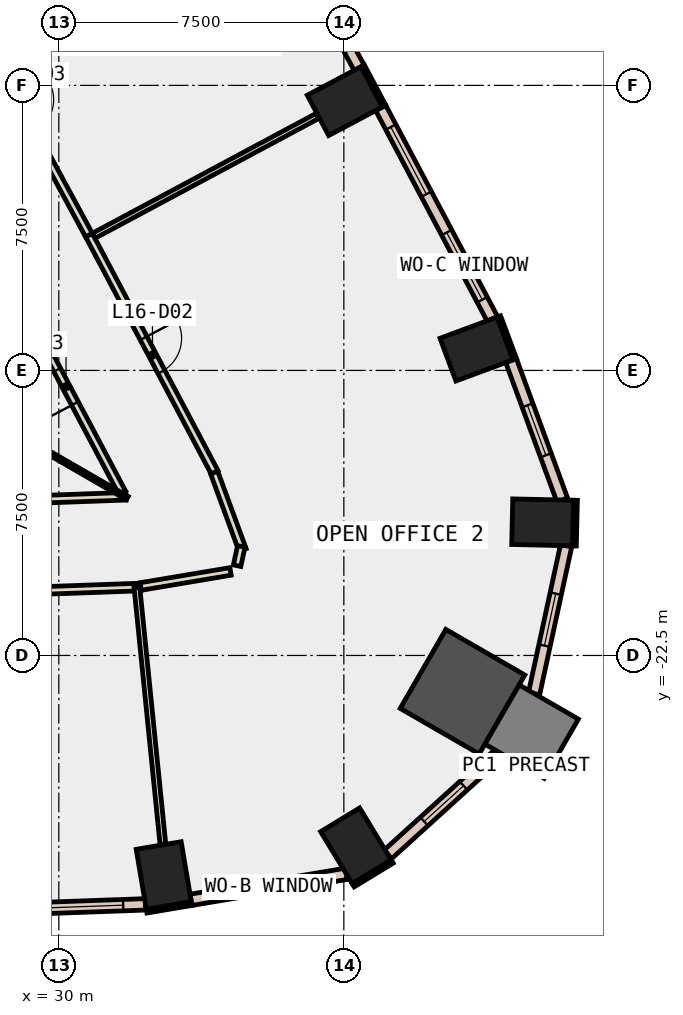
"""IFC4 building model, lengths in metres.
Left out: names, types, materials, properties, quantities, classifications, styles, units other than length and angle.
Written with IfcOpenShell. Run it as: python <this file> out.ifc"""

import sys

from ifc_helpers import new_model, si_unit, direction, frame, frame_2d, origin, origin_2d, place, context, subcontext, project, spatial, rectangle, extrude, element, fill, save


model = new_model("IFC4")
c1 = context("Model", 3, precision=1e-05, world=origin(), true_north=direction((0.0, 1.0)))
c2 = subcontext(c1, "Body", "Model", "MODEL_VIEW")
j1 = project(units=[si_unit("LENGTHUNIT", "METRE"), si_unit("PLANEANGLEUNIT", "RADIAN")], contexts=[c1])
p1 = place(None, origin())
s1 = spatial("IfcSite", under=j1, at=p1, CompositionType="ELEMENT")
p2 = place(p1, origin())
s2 = spatial("IfcBuilding", under=s1, at=p2, CompositionType="ELEMENT")
p3 = place(p2, frame((0.0, 0.0, 77.0)))
s3 = spatial("IfcBuildingStorey", under=s2, at=p3, CompositionType="ELEMENT", Elevation=77.0)
for number, where, z_axis, x_axis in (
    (1, (32.761, -28.29, -0.4), (0.0, 0.0, 1.0), (0.986, 0.167, 0.0)),
    (2, (37.818, -27.508, -0.4), (0.0, 0.0, 1.0), (0.855, 0.519, 0.0)),
):
    element("IfcColumn", number, at=place(p3, frame(where, z_axis=z_axis, x_axis=x_axis)), inside=s3, PredefinedType="COLUMN", context=c2, shape_type="SweptSolid", body=[
        extrude(rectangle(XDim=1.2, YDim=1.6, at=origin_2d()), origin(), (0.0, 0.0, 1.0), 4.0),
    ])
p4 = place(p3, frame((40.623, -23.454, -0.4), z_axis=(0.0, 0.0, 1.0), x_axis=(-0.866025403784, 0.5, 0.0)))
e3 = element("IfcColumn", 3, at=p4, inside=s3, PredefinedType="COLUMN", context=c2, shape_type="SweptSolid", body=[
    extrude(rectangle(XDim=2.4, YDim=2.4, at=origin_2d()), origin(), (0.0, 0.0, 1.0), 4.0),
])
for number, where, z_axis, x_axis in (
    (4, (42.731, -18.998, -0.4), (0.0, 0.0, 1.0), (0.023, 1.0, 0.0)),
    (5, (40.99, -14.438, -0.4), (0.0, 0.0, 1.0), (-0.348, 0.937, 0.0)),
    (6, (37.526, -7.914, -0.4), (0.0, 0.0, 1.0), (-0.469, 0.883, 0.0)),
):
    element("IfcColumn", number, at=place(p3, frame(where, z_axis=z_axis, x_axis=x_axis)), inside=s3, PredefinedType="COLUMN", context=c2, shape_type="SweptSolid", body=[
        extrude(rectangle(XDim=1.2, YDim=1.6, at=origin_2d()), origin(), (0.0, 0.0, 1.0), 4.0),
    ])
p5 = place(p3, frame((42.442, -24.504, -0.4), z_axis=(0.0, 0.0, 1.0), x_axis=(-0.866025403784, 0.5, 0.0)))
e7 = element("IfcColumn", 7, at=p5, inside=s3, PredefinedType="COLUMN", context=c2, shape_type="SweptSolid", body=[
    extrude(rectangle(XDim=1.8, YDim=1.8, at=origin_2d()), origin(), (0.0, 0.0, 1.0), 4.0),
])
p6 = place(p3, frame((41.996, -14.705, 0.0), z_axis=(0.0, 0.0, 1.0), x_axis=(-0.348446984414, 0.937328490473, 0.0)))
e8 = element("IfcWall", 8, at=p6, inside=s3, PredefinedType="STANDARD", context=c2, shape_type="SweptSolid", body=[
    extrude(rectangle(XDim=1.2, YDim=0.1, at=frame_2d((0.6, 0.0))), origin(), (0.0, 0.0, 1.0), 3.6),
])
p7 = place(p3, frame((38.558, -8.045, 0.0), z_axis=(0.0, 0.0, 1.0), x_axis=(-0.469467784567, 0.882949601763, 0.0)))
e9 = element("IfcWall", 9, at=p7, inside=s3, PredefinedType="STANDARD", context=c2, shape_type="SweptSolid", body=[
    extrude(rectangle(XDim=1.199, YDim=0.1, at=frame_2d((0.6, 0.0))), origin(), (0.0, 0.0, 1.0), 3.6),
])
p8 = place(p3, frame((32.311, -29.228, 0.0), z_axis=(0.0, 0.0, 1.0), x_axis=(0.986011774526, 0.166675674579, 0.0)))
e10 = element("IfcWall", 10, at=p8, inside=s3, PredefinedType="STANDARD", context=c2, shape_type="SweptSolid", body=[
    extrude(rectangle(XDim=1.2, YDim=0.1, at=frame_2d((0.6, 0.0))), origin(), (0.0, 0.0, 1.0), 3.6),
])
for number, where, z_axis, x_axis in (
    (11, (37.746, -28.546, 0.0), (0.0, 0.0, 1.0), (0.855, 0.519, 0.0)),
    (12, (43.567, -19.617, 0.0), (0.0, 0.0, 1.0), (0.023, 1.0, 0.0)),
):
    element("IfcWall", number, at=place(p3, frame(where, z_axis=z_axis, x_axis=x_axis)), inside=s3, PredefinedType="STANDARD", context=c2, shape_type="SweptSolid", body=[
        extrude(rectangle(XDim=1.2, YDim=0.1, at=frame_2d((0.6, 0.0))), origin(), (0.0, 0.0, 1.0), 3.6),
    ])
p9 = place(p3, frame((25.134, -29.305, 0.0), z_axis=(0.0, 0.0, 1.0), x_axis=(0.999359981296, 0.035771885388, 0.0)))
e13 = element("IfcWall", 13, at=p9, inside=s3, PredefinedType="STANDARD", context=c2, shape_type="SweptSolid", body=[
    extrude(rectangle(XDim=7.153, YDim=0.3, at=frame_2d((3.576, 0.0))), origin(), (0.0, 0.0, 1.0), 3.6),
])
p10 = place(p9, frame((0.588, 0.0, 0.9)))
e14 = element("IfcOpeningElement", 14, at=p10, cuts=e13, PredefinedType="OPENING", context=c2, shape_type="SweptSolid", body=[
    extrude(rectangle(XDim=2.4, YDim=2.6, at=frame_2d((1.2, 1.3))), frame((0.0, 0.16, 0.0), z_axis=(0.0, -1.0, 0.0), x_axis=(1.0, 0.0, 0.0)), (0.0, 0.0, 1.0), 0.32),
])
p11 = place(p9, frame((4.164, 0.0, 0.9)))
e15 = element("IfcOpeningElement", 15, at=p11, cuts=e13, PredefinedType="OPENING", context=c2, shape_type="SweptSolid", body=[
    extrude(rectangle(XDim=2.4, YDim=2.6, at=frame_2d((1.2, 1.3))), frame((0.0, 0.16, 0.0), z_axis=(0.0, -1.0, 0.0), x_axis=(1.0, 0.0, 0.0)), (0.0, 0.0, 1.0), 0.32),
])
p12 = place(p3, frame((33.477, -28.93, 0.0), z_axis=(0.0, 0.0, 1.0), x_axis=(0.986295041399, 0.164991185557, 0.0)))
e16 = element("IfcWall", 16, at=p12, inside=s3, PredefinedType="STANDARD", context=c2, shape_type="SweptSolid", body=[
    extrude(rectangle(XDim=4.145, YDim=0.3, at=frame_2d((2.072, 0.0))), origin(), (0.0, 0.0, 1.0), 3.6),
])
p13 = place(p12, frame((1.372, 0.0, 0.9)))
e17 = element("IfcOpeningElement", 17, at=p13, cuts=e16, PredefinedType="OPENING", context=c2, shape_type="SweptSolid", body=[
    extrude(rectangle(XDim=1.4, YDim=2.6, at=frame_2d((0.7, 1.3))), frame((0.0, 0.16, 0.0), z_axis=(0.0, -1.0, 0.0), x_axis=(1.0, 0.0, 0.0)), (0.0, 0.0, 1.0), 0.32),
])
p14 = place(p3, frame((38.657, -27.736, 0.0), z_axis=(0.0, 0.0, 1.0), x_axis=(0.740547309915, 0.6720042275, 0.0)))
e18 = element("IfcWall", 18, at=p14, inside=s3, PredefinedType="STANDARD", context=c2, shape_type="SweptSolid", body=[
    extrude(rectangle(XDim=3.982, YDim=0.3, at=frame_2d((1.991, 0.0))), origin(), (0.0, 0.0, 1.0), 3.6),
])
p15 = place(p14, frame((1.291, 0.0, 0.9)))
e19 = element("IfcOpeningElement", 19, at=p15, cuts=e18, PredefinedType="OPENING", context=c2, shape_type="SweptSolid", body=[
    extrude(rectangle(XDim=1.4, YDim=2.6, at=frame_2d((0.7, 1.3))), frame((0.0, 0.16, 0.0), z_axis=(0.0, -1.0, 0.0), x_axis=(1.0, 0.0, 0.0)), (0.0, 0.0, 1.0), 0.32),
])
p16 = place(p3, frame((42.506, -23.503, 0.0), z_axis=(0.0, 0.0, 1.0), x_axis=(0.211701618364, 0.977334346466, 0.0)))
e20 = element("IfcWall", 20, at=p16, inside=s3, PredefinedType="STANDARD", context=c2, shape_type="SweptSolid", body=[
    extrude(rectangle(XDim=3.982, YDim=0.3, at=frame_2d((1.991, 0.0))), origin(), (0.0, 0.0, 1.0), 3.6),
])
p17 = place(p16, frame((1.291, 0.0, 0.9)))
e21 = element("IfcOpeningElement", 21, at=p17, cuts=e20, PredefinedType="OPENING", context=c2, shape_type="SweptSolid", body=[
    extrude(rectangle(XDim=1.4, YDim=2.6, at=frame_2d((0.7, 1.3))), frame((0.0, 0.16, 0.0), z_axis=(0.0, -1.0, 0.0), x_axis=(1.0, 0.0, 0.0)), (0.0, 0.0, 1.0), 0.32),
])
p18 = place(p3, frame((43.248, -18.41, 0.0), z_axis=(0.0, 0.0, 1.0), x_axis=(-0.344819708397, 0.938668934556, 0.0)))
e22 = element("IfcWall", 22, at=p18, inside=s3, PredefinedType="STANDARD", context=c2, shape_type="SweptSolid", body=[
    extrude(rectangle(XDim=3.91, YDim=0.3, at=frame_2d((1.955, 0.0))), origin(), (0.0, 0.0, 1.0), 3.6),
])
p19 = place(p18, frame((1.255, 0.0, 0.9)))
e23 = element("IfcOpeningElement", 23, at=p19, cuts=e22, PredefinedType="OPENING", context=c2, shape_type="SweptSolid", body=[
    extrude(rectangle(XDim=1.4, YDim=2.6, at=frame_2d((0.7, 1.3))), frame((0.0, 0.16, 0.0), z_axis=(0.0, -1.0, 0.0), x_axis=(1.0, 0.0, 0.0)), (0.0, 0.0, 1.0), 0.32),
])
p20 = place(p3, frame((41.409, -13.644, 0.0), z_axis=(0.0, 0.0, 1.0), x_axis=(-0.467968066899, 0.883745375299, 0.0)))
e24 = element("IfcWall", 24, at=p20, inside=s3, PredefinedType="STANDARD", context=c2, shape_type="SweptSolid", body=[
    extrude(rectangle(XDim=6.282, YDim=0.3, at=frame_2d((3.141, 0.0))), origin(), (0.0, 0.0, 1.0), 3.6),
])
p21 = place(p20, frame((0.571, 0.0, 0.9)))
e25 = element("IfcOpeningElement", 25, at=p21, cuts=e24, PredefinedType="OPENING", context=c2, shape_type="SweptSolid", body=[
    extrude(rectangle(XDim=2.0, YDim=2.6, at=frame_2d((1.0, 1.3))), frame((0.0, 0.16, 0.0), z_axis=(0.0, -1.0, 0.0), x_axis=(1.0, 0.0, 0.0)), (0.0, 0.0, 1.0), 0.32),
])
p22 = place(p20, frame((3.712, 0.0, 0.9)))
e26 = element("IfcOpeningElement", 26, at=p22, cuts=e24, PredefinedType="OPENING", context=c2, shape_type="SweptSolid", body=[
    extrude(rectangle(XDim=2.0, YDim=2.6, at=frame_2d((1.0, 1.3))), frame((0.0, 0.16, 0.0), z_axis=(0.0, -1.0, 0.0), x_axis=(1.0, 0.0, 0.0)), (0.0, 0.0, 1.0), 0.32),
])
p23 = place(p3, frame((37.903, -7.036, 0.0), z_axis=(0.0, 0.0, 1.0), x_axis=(-0.476174096946, 0.879351027404, 0.0)))
e27 = element("IfcWall", 27, at=p23, inside=s3, PredefinedType="STANDARD", context=c2, shape_type="SweptSolid", body=[
    extrude(rectangle(XDim=6.131, YDim=0.3, at=frame_2d((3.065, 0.0))), origin(), (0.0, 0.0, 1.0), 3.6),
])
p24 = place(p23, frame((0.533, 0.0, 0.9)))
e28 = element("IfcOpeningElement", 28, at=p24, cuts=e27, PredefinedType="OPENING", context=c2, shape_type="SweptSolid", body=[
    extrude(rectangle(XDim=2.0, YDim=2.6, at=frame_2d((1.0, 1.3))), frame((0.0, 0.16, 0.0), z_axis=(0.0, -1.0, 0.0), x_axis=(1.0, 0.0, 0.0)), (0.0, 0.0, 1.0), 0.32),
])
p25 = place(p23, frame((3.598, 0.0, 0.9)))
e29 = element("IfcOpeningElement", 29, at=p25, cuts=e27, PredefinedType="OPENING", context=c2, shape_type="SweptSolid", body=[
    extrude(rectangle(XDim=2.0, YDim=2.6, at=frame_2d((1.0, 1.3))), frame((0.0, 0.16, 0.0), z_axis=(0.0, -1.0, 0.0), x_axis=(1.0, 0.0, 0.0)), (0.0, 0.0, 1.0), 0.32),
])
p26 = place(p3, frame((24.208, -18.581, 0.0), z_axis=(0.0, 0.0, 1.0), x_axis=(0.99936260762, 0.035698438215, 0.0)))
e30 = element("IfcWall", 30, at=p26, inside=s3, PredefinedType="PARTITIONING", context=c2, shape_type="SweptSolid", body=[
    extrude(rectangle(XDim=7.564, YDim=0.2, at=frame_2d((3.782, 0.0))), origin(), (0.0, 0.0, 1.0), 3.6),
])
p27 = place(p26, frame((3.282, 0.0, 0.0)))
e31 = element("IfcOpeningElement", 31, at=p27, cuts=e30, PredefinedType="OPENING", context=c2, shape_type="SweptSolid", body=[
    extrude(rectangle(XDim=1.0, YDim=2.1, at=frame_2d((0.5, 1.05))), frame((0.0, 0.11, 0.0), z_axis=(0.0, -1.0, 0.0), x_axis=(1.0, 0.0, 0.0)), (0.0, 0.0, 1.0), 0.22),
])
p28 = place(p3, frame((31.668, -18.219, 0.0), z_axis=(0.0, 0.0, 1.0), x_axis=(-0.468058220157, 0.883697630722, 0.0)))
e32 = element("IfcWall", 32, at=p28, inside=s3, PredefinedType="PARTITIONING", context=c2, shape_type="SweptSolid", body=[
    extrude(rectangle(XDim=6.316, YDim=0.2, at=frame_2d((3.158, 0.0))), origin(), (0.0, 0.0, 1.0), 3.6),
])
p29 = place(p28, frame((2.658, 0.0, 0.0)))
e33 = element("IfcOpeningElement", 33, at=p29, cuts=e32, PredefinedType="OPENING", context=c2, shape_type="SweptSolid", body=[
    extrude(rectangle(XDim=1.0, YDim=2.1, at=frame_2d((0.5, 1.05))), frame((0.0, 0.11, 0.0), z_axis=(0.0, -1.0, 0.0), x_axis=(1.0, 0.0, 0.0)), (0.0, 0.0, 1.0), 0.22),
])
p30 = place(p3, frame((32.154, -20.699, 0.0), z_axis=(0.0, 0.0, 1.0), x_axis=(-0.999363643656, -0.035669423029, 0.0)))
e34 = element("IfcWall", 34, at=p30, inside=s3, PredefinedType="PARTITIONING", context=c2, shape_type="SweptSolid", body=[
    extrude(rectangle(XDim=7.878, YDim=0.2, at=frame_2d((3.939, 0.0))), origin(), (0.0, 0.0, 1.0), 3.6),
])
p31 = place(p3, frame((30.793, -11.439, 0.0), z_axis=(0.0, 0.0, 1.0), x_axis=(0.468043291185, -0.883705537822, 0.0)))
e35 = element("IfcWall", 35, at=p31, inside=s3, PredefinedType="PARTITIONING", context=c2, shape_type="SweptSolid", body=[
    extrude(rectangle(XDim=7.066, YDim=0.2, at=frame_2d((3.533, 0.0))), origin(), (0.0, 0.0, 1.0), 3.6),
])
p32 = place(p31, frame((3.071, 0.0, 0.0)))
e36 = element("IfcOpeningElement", 36, at=p32, cuts=e35, PredefinedType="OPENING", context=c2, shape_type="SweptSolid", body=[
    extrude(rectangle(XDim=1.0, YDim=2.1, at=frame_2d((0.5, 1.05))), frame((0.0, 0.11, 0.0), z_axis=(0.0, -1.0, 0.0), x_axis=(1.0, 0.0, 0.0)), (0.0, 0.0, 1.0), 0.22),
])
p33 = place(p3, frame((34.088, -17.689, 0.0), z_axis=(0.0, 0.0, 1.0), x_axis=(0.34459875492, -0.938750072228, 0.0)))
e37 = element("IfcWall", 37, at=p33, inside=s3, PredefinedType="PARTITIONING", context=c2, shape_type="SweptSolid", body=[
    extrude(rectangle(XDim=2.168, YDim=0.2, at=frame_2d((1.084, 0.0))), origin(), (0.0, 0.0, 1.0), 3.6),
])
p34 = place(p3, frame((34.801, -19.631, 0.0), z_axis=(0.0, 0.0, 1.0), x_axis=(-0.212292845768, -0.977206092713, 0.0)))
e38 = element("IfcWall", 38, at=p34, inside=s3, PredefinedType="PARTITIONING", context=c2, shape_type="SweptSolid", body=[
    extrude(rectangle(XDim=0.519, YDim=0.2, at=frame_2d((0.259, 0.0))), origin(), (0.0, 0.0, 1.0), 3.6),
])
p35 = place(p3, frame((34.518, -20.289, 0.0), z_axis=(0.0, 0.0, 1.0), x_axis=(-0.986214562432, -0.165471559025, 0.0)))
e39 = element("IfcWall", 39, at=p35, inside=s3, PredefinedType="PARTITIONING", context=c2, shape_type="SweptSolid", body=[
    extrude(rectangle(XDim=2.399, YDim=0.2, at=frame_2d((1.199, 0.0))), origin(), (0.0, 0.0, 1.0), 3.6),
])
p36 = place(p3, frame((27.339, -5.062, 0.0), z_axis=(0.0, 0.0, 1.0), x_axis=(0.476248444599, -0.879310763619, 0.0)))
e40 = element("IfcWall", 40, at=p36, inside=s3, PredefinedType="PARTITIONING", context=c2, shape_type="SweptSolid", body=[
    extrude(rectangle(XDim=7.252, YDim=0.2, at=frame_2d((3.626, 0.0))), origin(), (0.0, 0.0, 1.0), 3.6),
])
p37 = place(p36, frame((3.201, 0.0, 0.0)))
e41 = element("IfcOpeningElement", 41, at=p37, cuts=e40, PredefinedType="OPENING", context=c2, shape_type="SweptSolid", body=[
    extrude(rectangle(XDim=1.0, YDim=2.1, at=frame_2d((0.5, 1.05))), frame((0.0, 0.11, 0.0), z_axis=(0.0, -1.0, 0.0), x_axis=(1.0, 0.0, 0.0)), (0.0, 0.0, 1.0), 0.22),
])
p38 = place(p3, frame((22.929, -13.235, 0.0), z_axis=(0.0, 0.0, 1.0), x_axis=(0.866003823807, -0.500037375755, 0.0)))
e42 = element("IfcWall", 42, at=p38, inside=s3, PredefinedType="PARTITIONING", context=c2, shape_type="SweptSolid", body=[
    extrude(rectangle(XDim=10.245, YDim=0.1, at=frame_2d((5.123, 0.0))), origin(), (0.0, 0.0, 1.0), 3.6),
])
p39 = place(p3, frame((32.054, -20.702, 0.0), z_axis=(0.0, 0.0, 1.0), x_axis=(0.100681219953, -0.994918736354, 0.0)))
e43 = element("IfcWall", 43, at=p39, inside=s3, PredefinedType="PARTITIONING", context=c2, shape_type="SweptSolid", body=[
    extrude(rectangle(XDim=6.794, YDim=0.15, at=frame_2d((3.397, 0.0))), origin(), (0.0, 0.0, 1.0), 3.6),
])
p40 = place(p3, frame((30.916, -11.458, 0.0), z_axis=(0.0, 0.0, 1.0), x_axis=(0.881525059883, 0.472137235132, 0.0)))
e44 = element("IfcWall", 44, at=p40, inside=s3, PredefinedType="PARTITIONING", context=c2, shape_type="SweptSolid", body=[
    extrude(rectangle(XDim=6.68, YDim=0.15, at=frame_2d((3.34, 0.0))), origin(), (0.0, 0.0, 1.0), 3.6),
])
p41 = place(p11, origin())
e45 = element("IfcWindow", 45, at=p41, inside=s3, PartitioningType="SINGLE_PANEL", PredefinedType="WINDOW", context=c2, shape_type="SweptSolid", body=[
    extrude(rectangle(XDim=2.4, YDim=2.6, at=frame_2d((1.2, 1.3))), frame((0.0, 0.03, 0.0), z_axis=(0.0, -1.0, 0.0), x_axis=(1.0, 0.0, 0.0)), (0.0, 0.0, 1.0), 0.06),
])
fill(e15, e45)
p42 = place(p13, origin())
e46 = element("IfcWindow", 46, at=p42, inside=s3, PartitioningType="SINGLE_PANEL", PredefinedType="WINDOW", context=c2, shape_type="SweptSolid", body=[
    extrude(rectangle(XDim=1.4, YDim=2.6, at=frame_2d((0.7, 1.3))), frame((0.0, 0.03, 0.0), z_axis=(0.0, -1.0, 0.0), x_axis=(1.0, 0.0, 0.0)), (0.0, 0.0, 1.0), 0.06),
])
fill(e17, e46)
p43 = place(p15, origin())
e47 = element("IfcWindow", 47, at=p43, inside=s3, PartitioningType="SINGLE_PANEL", PredefinedType="WINDOW", context=c2, shape_type="SweptSolid", body=[
    extrude(rectangle(XDim=1.4, YDim=2.6, at=frame_2d((0.7, 1.3))), frame((0.0, 0.03, 0.0), z_axis=(0.0, -1.0, 0.0), x_axis=(1.0, 0.0, 0.0)), (0.0, 0.0, 1.0), 0.06),
])
fill(e19, e47)
p44 = place(p17, origin())
e48 = element("IfcWindow", 48, at=p44, inside=s3, PartitioningType="SINGLE_PANEL", PredefinedType="WINDOW", context=c2, shape_type="SweptSolid", body=[
    extrude(rectangle(XDim=1.4, YDim=2.6, at=frame_2d((0.7, 1.3))), frame((0.0, 0.03, 0.0), z_axis=(0.0, -1.0, 0.0), x_axis=(1.0, 0.0, 0.0)), (0.0, 0.0, 1.0), 0.06),
])
fill(e21, e48)
p45 = place(p19, origin())
e49 = element("IfcWindow", 49, at=p45, inside=s3, PartitioningType="SINGLE_PANEL", PredefinedType="WINDOW", context=c2, shape_type="SweptSolid", body=[
    extrude(rectangle(XDim=1.4, YDim=2.6, at=frame_2d((0.7, 1.3))), frame((0.0, 0.03, 0.0), z_axis=(0.0, -1.0, 0.0), x_axis=(1.0, 0.0, 0.0)), (0.0, 0.0, 1.0), 0.06),
])
fill(e23, e49)
p46 = place(p21, origin())
e50 = element("IfcWindow", 50, at=p46, inside=s3, PartitioningType="SINGLE_PANEL", PredefinedType="WINDOW", context=c2, shape_type="SweptSolid", body=[
    extrude(rectangle(XDim=2.0, YDim=2.6, at=frame_2d((1.0, 1.3))), frame((0.0, 0.03, 0.0), z_axis=(0.0, -1.0, 0.0), x_axis=(1.0, 0.0, 0.0)), (0.0, 0.0, 1.0), 0.06),
])
fill(e25, e50)
p47 = place(p22, origin())
e51 = element("IfcWindow", 51, at=p47, inside=s3, PartitioningType="SINGLE_PANEL", PredefinedType="WINDOW", context=c2, shape_type="SweptSolid", body=[
    extrude(rectangle(XDim=2.0, YDim=2.6, at=frame_2d((1.0, 1.3))), frame((0.0, 0.03, 0.0), z_axis=(0.0, -1.0, 0.0), x_axis=(1.0, 0.0, 0.0)), (0.0, 0.0, 1.0), 0.06),
])
fill(e26, e51)
p48 = place(p32, origin())
e52 = element("IfcDoor", 52, at=p48, inside=s3, OperationType="SINGLE_SWING_RIGHT", PredefinedType="DOOR", context=c2, shape_type="SweptSolid", body=[
    extrude(rectangle(XDim=1.0, YDim=2.1, at=frame_2d((0.5, 1.05))), frame((0.0, 0.025, 0.0), z_axis=(0.0, -1.0, 0.0), x_axis=(1.0, 0.0, 0.0)), (0.0, 0.0, 1.0), 0.05),
])
fill(e36, e52)
p49 = place(p29, origin())
e53 = element("IfcDoor", 53, at=p49, inside=s3, OperationType="SINGLE_SWING_LEFT", PredefinedType="DOOR", context=c2, shape_type="SweptSolid", body=[
    extrude(rectangle(XDim=1.0, YDim=2.1, at=frame_2d((0.5, 1.05))), frame((0.0, 0.025, 0.0), z_axis=(0.0, -1.0, 0.0), x_axis=(1.0, 0.0, 0.0)), (0.0, 0.0, 1.0), 0.05),
])
fill(e33, e53)
save(model, sys.argv[1])
